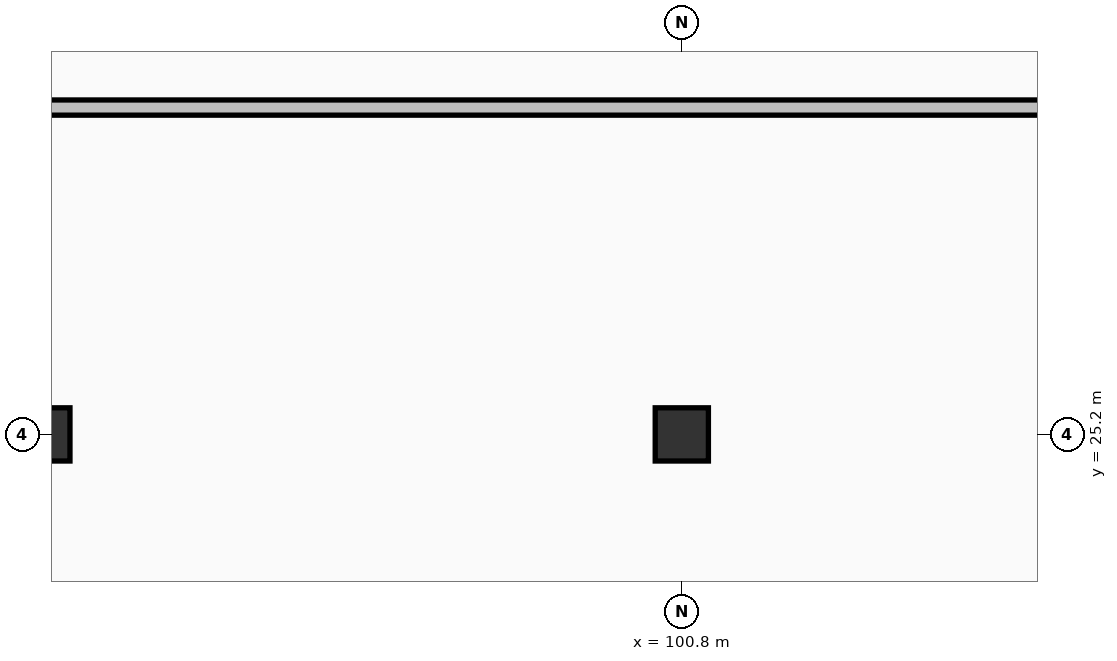
"""IFC4 building model, lengths in metres.
Left out: names, types, materials, properties, quantities, classifications, styles, units other than length and angle.
Written with IfcOpenShell. Run it as: python <this file> out.ifc"""

import sys

from ifc_helpers import new_model, si_unit, direction, frame, frame_2d, origin, origin_2d, place, context, subcontext, project, spatial, rectangle, extrude, element, save


model = new_model("IFC4")
c1 = context("Model", 3, precision=1e-05, world=origin(), true_north=direction((0.0, 1.0)))
c2 = subcontext(c1, "Body", "Model", "MODEL_VIEW")
j1 = project(units=[si_unit("LENGTHUNIT", "METRE"), si_unit("PLANEANGLEUNIT", "RADIAN")], contexts=[c1])
p1 = place(None, origin())
s1 = spatial("IfcSite", under=j1, at=p1, CompositionType="ELEMENT")
p2 = place(p1, origin())
s2 = spatial("IfcBuilding", under=s1, at=p2, CompositionType="ELEMENT")
p3 = place(p2, frame((0.0, 0.0, -4.2)))
s3 = spatial("IfcBuildingStorey", under=s2, at=p3, CompositionType="ELEMENT", Elevation=-4.2)
for number, where, z_axis, x_axis in (
    (1, (92.4, 25.2, 0.0), (0.0, 0.0, 1.0), (1.0, 0.0, 0.0)),
    (2, (100.8, 25.2, 0.0), (0.0, 0.0, 1.0), (1.0, 0.0, 0.0)),
):
    element("IfcColumn", number, at=place(p3, frame(where, z_axis=z_axis, x_axis=x_axis)), inside=s3, PredefinedType="COLUMN", context=c2, shape_type="SweptSolid", body=[
        extrude(rectangle(XDim=0.7, YDim=0.7, at=origin_2d()), origin(), (0.0, 0.0, 1.0), 4.2),
    ])
p4 = place(p3, frame((91.8, 29.5, 0.0), z_axis=(0.0, 0.0, 1.0), x_axis=(1.0, 0.0, 0.0)))
e3 = element("IfcWall", 3, at=p4, inside=s3, PredefinedType="SOLIDWALL", context=c2, shape_type="SweptSolid", body=[
    extrude(rectangle(XDim=68.4, YDim=0.2, at=frame_2d((34.2, 0.0))), origin(), (0.0, 0.0, 1.0), 3.85),
])
p5 = place(p4, frame((14.0, 0.0, 0.0)))
e4 = element("IfcOpeningElement", 4, at=p5, cuts=e3, PredefinedType="OPENING", context=c2, shape_type="SweptSolid", body=[
    extrude(rectangle(XDim=1.65, YDim=2.25, at=frame_2d((0.825, 1.125))), frame((0.0, 0.11, 0.0), z_axis=(0.0, -1.0, 0.0), x_axis=(1.0, 0.0, 0.0)), (0.0, 0.0, 1.0), 0.22),
])
p6 = place(p4, frame((48.0, 0.0, 0.0)))
e5 = element("IfcOpeningElement", 5, at=p6, cuts=e3, PredefinedType="OPENING", context=c2, shape_type="SweptSolid", body=[
    extrude(rectangle(XDim=1.65, YDim=2.25, at=frame_2d((0.825, 1.125))), frame((0.0, 0.11, 0.0), z_axis=(0.0, -1.0, 0.0), x_axis=(1.0, 0.0, 0.0)), (0.0, 0.0, 1.0), 0.22),
])
save(model, sys.argv[1])
